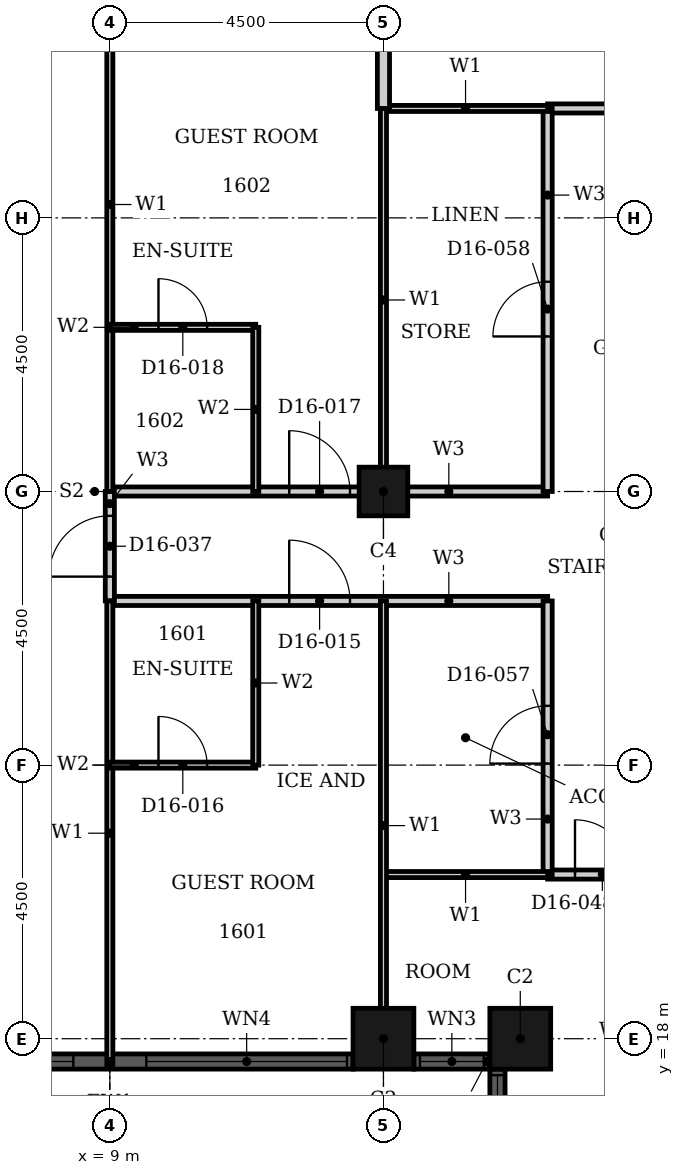
"""IFC4 building model, lengths in metres.
Left out: names, types, materials, properties, quantities, classifications, styles, units other than length and angle.
Written with IfcOpenShell. Run it as: python <this file> out.ifc"""

import sys

from ifc_helpers import new_model, si_unit, direction, frame, frame_2d, origin, origin_2d, place, context, subcontext, project, spatial, rectangle, hollow_rectangle, extrude, element, fill, save


model = new_model("IFC4")
c1 = context("Model", 3, precision=1e-05, world=origin(), true_north=direction((0.0, 1.0)))
c2 = subcontext(c1, "Body", "Model", "MODEL_VIEW")
j1 = project(units=[si_unit("LENGTHUNIT", "METRE"), si_unit("PLANEANGLEUNIT", "RADIAN")], contexts=[c1])
p1 = place(None, origin())
s1 = spatial("IfcSite", under=j1, at=p1, CompositionType="ELEMENT")
p2 = place(p1, origin())
s2 = spatial("IfcBuilding", under=s1, at=p2, CompositionType="ELEMENT")
p3 = place(p2, frame((0.0, 0.0, 70.8)))
s3 = spatial("IfcBuildingStorey", under=s2, at=p3, CompositionType="ELEMENT", Elevation=70.8)
for number, where, z_axis, x_axis in (
    (1, (13.5, 18.0, 0.0), (0.0, 0.0, 1.0), (1.0, 0.0, 0.0)),
    (2, (15.75, 18.0, 0.0), (0.0, 0.0, 1.0), (1.0, 0.0, 0.0)),
):
    element("IfcColumn", number, at=place(p3, frame(where, z_axis=z_axis, x_axis=x_axis)), inside=s3, PredefinedType="COLUMN", context=c2, shape_type="SweptSolid", body=[
        extrude(hollow_rectangle(XDim=1.0, YDim=1.0, WallThickness=0.032, at=origin_2d()), origin(), (0.0, 0.0, 1.0), 3.6),
    ])
p4 = place(p3, frame((13.5, 27.0, 0.0), z_axis=(0.0, 0.0, 1.0), x_axis=(1.0, 0.0, 0.0)))
e3 = element("IfcColumn", 3, at=p4, inside=s3, PredefinedType="COLUMN", context=c2, shape_type="SweptSolid", body=[
    extrude(hollow_rectangle(XDim=0.8, YDim=0.8, WallThickness=0.025, at=origin_2d()), origin(), (0.0, 0.0, 1.0), 3.6),
])
p5 = place(p3, frame((5.0, 17.625, 0.0), z_axis=(0.0, 0.0, 1.0), x_axis=(1.0, 0.0, 0.0)))
e4 = element("IfcWall", 4, at=p5, inside=s3, PredefinedType="SOLIDWALL", context=c2, shape_type="SweptSolid", body=[
    extrude(rectangle(XDim=8.0, YDim=0.25, at=frame_2d((4.0, 0.0))), origin(), (0.0, 0.0, 1.0), 3.6),
])
p6 = place(p5, frame((0.1, 0.0, 0.9)))
e5 = element("IfcOpeningElement", 5, at=p6, cuts=e4, PredefinedType="OPENING", context=c2, shape_type="SweptSolid", body=[
    extrude(rectangle(XDim=3.3, YDim=2.08, at=frame_2d((1.65, 1.04))), frame((0.0, 0.135, 0.0), z_axis=(0.0, -1.0, 0.0), x_axis=(1.0, 0.0, 0.0)), (0.0, 0.0, 1.0), 0.27),
])
p7 = place(p5, frame((4.6, 0.0, 0.9)))
e6 = element("IfcOpeningElement", 6, at=p7, cuts=e4, PredefinedType="OPENING", context=c2, shape_type="SweptSolid", body=[
    extrude(rectangle(XDim=3.3, YDim=2.08, at=frame_2d((1.65, 1.04))), frame((0.0, 0.135, 0.0), z_axis=(0.0, -1.0, 0.0), x_axis=(1.0, 0.0, 0.0)), (0.0, 0.0, 1.0), 0.27),
])
p8 = place(p3, frame((14.0, 17.625, 0.0), z_axis=(0.0, 0.0, 1.0), x_axis=(1.0, 0.0, 0.0)))
e7 = element("IfcWall", 7, at=p8, inside=s3, PredefinedType="SOLIDWALL", context=c2, shape_type="SweptSolid", body=[
    extrude(rectangle(XDim=1.25, YDim=0.25, at=frame_2d((0.625, 0.0))), origin(), (0.0, 0.0, 1.0), 3.6),
])
p9 = place(p8, frame((0.1, 0.0, 0.9)))
e8 = element("IfcOpeningElement", 8, at=p9, cuts=e7, PredefinedType="OPENING", context=c2, shape_type="SweptSolid", body=[
    extrude(rectangle(XDim=1.05, YDim=2.08, at=frame_2d((0.525, 1.04))), frame((0.0, 0.135, 0.0), z_axis=(0.0, -1.0, 0.0), x_axis=(1.0, 0.0, 0.0)), (0.0, 0.0, 1.0), 0.27),
])
p10 = place(p3, frame((15.375, 17.5, 0.0), z_axis=(0.0, 0.0, 1.0), x_axis=(0.0, -1.0, 0.0)))
e9 = element("IfcWall", 9, at=p10, inside=s3, PredefinedType="SOLIDWALL", context=c2, shape_type="SweptSolid", body=[
    extrude(rectangle(XDim=1.25, YDim=0.25, at=frame_2d((0.625, 0.0))), origin(), (0.0, 0.0, 1.0), 3.6),
])
p11 = place(p10, frame((0.1, 0.0, 0.9)))
e10 = element("IfcOpeningElement", 10, at=p11, cuts=e9, PredefinedType="OPENING", context=c2, shape_type="SweptSolid", body=[
    extrude(rectangle(XDim=1.05, YDim=2.08, at=frame_2d((0.525, 1.04))), frame((0.0, 0.135, 0.0), z_axis=(0.0, -1.0, 0.0), x_axis=(1.0, 0.0, 0.0)), (0.0, 0.0, 1.0), 0.27),
])
p12 = place(p3, frame((16.2, 20.7, 0.0), z_axis=(0.0, 0.0, 1.0), x_axis=(1.0, 0.0, 0.0)))
e11 = element("IfcWall", 11, at=p12, inside=s3, PredefinedType="PARTITIONING", context=c2, shape_type="SweptSolid", body=[
    extrude(rectangle(XDim=13.5, YDim=0.15, at=frame_2d((6.75, 0.0))), origin(), (0.0, 0.0, 1.0), 3.3),
])
p13 = place(p12, frame((4.75, 0.0, 0.0)))
e12 = element("IfcOpeningElement", 12, at=p13, cuts=e11, PredefinedType="OPENING", context=c2, shape_type="SweptSolid", body=[
    extrude(rectangle(XDim=1.0, YDim=2.1, at=frame_2d((0.5, 1.05))), frame((0.0, 0.085, 0.0), z_axis=(0.0, -1.0, 0.0), x_axis=(1.0, 0.0, 0.0)), (0.0, 0.0, 1.0), 0.17),
])
p14 = place(p12, frame((0.45, 0.0, 0.0)))
e13 = element("IfcOpeningElement", 13, at=p14, cuts=e11, PredefinedType="OPENING", context=c2, shape_type="SweptSolid", body=[
    extrude(rectangle(XDim=0.9, YDim=2.1, at=frame_2d((0.45, 1.05))), frame((0.0, 0.085, 0.0), z_axis=(0.0, -1.0, 0.0), x_axis=(1.0, 0.0, 0.0)), (0.0, 0.0, 1.0), 0.17),
])
p15 = place(p12, frame((7.35, 0.0, 0.0)))
e14 = element("IfcOpeningElement", 14, at=p15, cuts=e11, PredefinedType="OPENING", context=c2, shape_type="SweptSolid", body=[
    extrude(rectangle(XDim=0.9, YDim=2.1, at=frame_2d((0.45, 1.05))), frame((0.0, 0.085, 0.0), z_axis=(0.0, -1.0, 0.0), x_axis=(1.0, 0.0, 0.0)), (0.0, 0.0, 1.0), 0.17),
])
p16 = place(p12, frame((10.95, 0.0, 0.0)))
e15 = element("IfcOpeningElement", 15, at=p16, cuts=e11, PredefinedType="OPENING", context=c2, shape_type="SweptSolid", body=[
    extrude(rectangle(XDim=0.9, YDim=2.1, at=frame_2d((0.45, 1.05))), frame((0.0, 0.085, 0.0), z_axis=(0.0, -1.0, 0.0), x_axis=(1.0, 0.0, 0.0)), (0.0, 0.0, 1.0), 0.17),
])
p17 = place(p3, frame((9.0, 25.2, 0.0), z_axis=(0.0, 0.0, 1.0), x_axis=(1.0, 0.0, 0.0)))
e16 = element("IfcWall", 16, at=p17, inside=s3, PredefinedType="PARTITIONING", context=c2, shape_type="SweptSolid", body=[
    extrude(rectangle(XDim=7.2, YDim=0.15, at=frame_2d((3.6, 0.0))), origin(), (0.0, 0.0, 1.0), 3.3),
])
p18 = place(p17, frame((2.95, 0.0, 0.0)))
e17 = element("IfcOpeningElement", 17, at=p18, cuts=e16, PredefinedType="OPENING", context=c2, shape_type="SweptSolid", body=[
    extrude(rectangle(XDim=1.0, YDim=2.1, at=frame_2d((0.5, 1.05))), frame((0.0, 0.085, 0.0), z_axis=(0.0, -1.0, 0.0), x_axis=(1.0, 0.0, 0.0)), (0.0, 0.0, 1.0), 0.17),
])
p19 = place(p3, frame((9.0, 27.0, 0.0), z_axis=(0.0, 0.0, 1.0), x_axis=(1.0, 0.0, 0.0)))
e18 = element("IfcWall", 18, at=p19, inside=s3, PredefinedType="PARTITIONING", context=c2, shape_type="SweptSolid", body=[
    extrude(rectangle(XDim=7.2, YDim=0.15, at=frame_2d((3.6, 0.0))), origin(), (0.0, 0.0, 1.0), 2.58),
])
p20 = place(p19, frame((2.95, 0.0, 0.0)))
e19 = element("IfcOpeningElement", 19, at=p20, cuts=e18, PredefinedType="OPENING", context=c2, shape_type="SweptSolid", body=[
    extrude(rectangle(XDim=1.0, YDim=2.1, at=frame_2d((0.5, 1.05))), frame((0.0, 0.085, 0.0), z_axis=(0.0, -1.0, 0.0), x_axis=(1.0, 0.0, 0.0)), (0.0, 0.0, 1.0), 0.17),
])
p21 = place(p3, frame((16.2, 33.3, 0.0), z_axis=(0.0, 0.0, 1.0), x_axis=(1.0, 0.0, 0.0)))
e20 = element("IfcWall", 20, at=p21, inside=s3, PredefinedType="PARTITIONING", context=c2, shape_type="SweptSolid", body=[
    extrude(rectangle(XDim=9.9, YDim=0.15, at=frame_2d((4.95, 0.0))), origin(), (0.0, 0.0, 1.0), 3.3),
])
p22 = place(p21, frame((4.75, 0.0, 0.0)))
e21 = element("IfcOpeningElement", 21, at=p22, cuts=e20, PredefinedType="OPENING", context=c2, shape_type="SweptSolid", body=[
    extrude(rectangle(XDim=1.0, YDim=2.1, at=frame_2d((0.5, 1.05))), frame((0.0, 0.085, 0.0), z_axis=(0.0, -1.0, 0.0), x_axis=(1.0, 0.0, 0.0)), (0.0, 0.0, 1.0), 0.17),
])
p23 = place(p21, frame((7.65, 0.0, 0.0)))
e22 = element("IfcOpeningElement", 22, at=p23, cuts=e20, PredefinedType="OPENING", context=c2, shape_type="SweptSolid", body=[
    extrude(rectangle(XDim=0.9, YDim=2.1, at=frame_2d((0.45, 1.05))), frame((0.0, 0.085, 0.0), z_axis=(0.0, -1.0, 0.0), x_axis=(1.0, 0.0, 0.0)), (0.0, 0.0, 1.0), 0.17),
])
p24 = place(p3, frame((16.2, 27.0, 0.0), z_axis=(0.0, 0.0, 1.0), x_axis=(0.0, 1.0, 0.0)))
e23 = element("IfcWall", 23, at=p24, inside=s3, PredefinedType="PARTITIONING", context=c2, shape_type="SweptSolid", body=[
    extrude(rectangle(XDim=6.3, YDim=0.15, at=frame_2d((3.15, 0.0))), origin(), (0.0, 0.0, 1.0), 3.3),
])
p25 = place(p24, frame((2.55, 0.0, 0.0)))
e24 = element("IfcOpeningElement", 24, at=p25, cuts=e23, PredefinedType="OPENING", context=c2, shape_type="SweptSolid", body=[
    extrude(rectangle(XDim=0.9, YDim=2.1, at=frame_2d((0.45, 1.05))), frame((0.0, 0.085, 0.0), z_axis=(0.0, -1.0, 0.0), x_axis=(1.0, 0.0, 0.0)), (0.0, 0.0, 1.0), 0.17),
])
p26 = place(p3, frame((16.2, 20.7, 0.0), z_axis=(0.0, 0.0, 1.0), x_axis=(0.0, 1.0, 0.0)))
e25 = element("IfcWall", 25, at=p26, inside=s3, PredefinedType="PARTITIONING", context=c2, shape_type="SweptSolid", body=[
    extrude(rectangle(XDim=4.5, YDim=0.15, at=frame_2d((2.25, 0.0))), origin(), (0.0, 0.0, 1.0), 3.3),
])
p27 = place(p26, frame((1.825, 0.0, 0.0)))
e26 = element("IfcOpeningElement", 26, at=p27, cuts=e25, PredefinedType="OPENING", context=c2, shape_type="SweptSolid", body=[
    extrude(rectangle(XDim=0.95, YDim=2.1, at=frame_2d((0.475, 1.05))), frame((0.0, 0.085, 0.0), z_axis=(0.0, -1.0, 0.0), x_axis=(1.0, 0.0, 0.0)), (0.0, 0.0, 1.0), 0.17),
])
p28 = place(p3, frame((9.0, 25.2, 0.0), z_axis=(0.0, 0.0, 1.0), x_axis=(0.0, 1.0, 0.0)))
e27 = element("IfcWall", 27, at=p28, inside=s3, PredefinedType="PARTITIONING", context=c2, shape_type="SweptSolid", body=[
    extrude(rectangle(XDim=1.8, YDim=0.15, at=frame_2d((0.9, 0.0))), origin(), (0.0, 0.0, 1.0), 3.3),
])
p29 = place(p28, frame((0.4, 0.0, 0.0)))
e28 = element("IfcOpeningElement", 28, at=p29, cuts=e27, PredefinedType="OPENING", context=c2, shape_type="SweptSolid", body=[
    extrude(rectangle(XDim=1.0, YDim=2.1, at=frame_2d((0.5, 1.05))), frame((0.0, 0.085, 0.0), z_axis=(0.0, -1.0, 0.0), x_axis=(1.0, 0.0, 0.0)), (0.0, 0.0, 1.0), 0.17),
])
for number, where, z_axis, x_axis in (
    (29, (13.5, 20.7, 0.0), (0.0, 0.0, 1.0), (1.0, 0.0, 0.0)),
    (30, (13.5, 33.3, 0.0), (0.0, 0.0, 1.0), (1.0, 0.0, 0.0)),
):
    element("IfcWall", number, at=place(p3, frame(where, z_axis=z_axis, x_axis=x_axis)), inside=s3, PredefinedType="PARTITIONING", context=c2, shape_type="SweptSolid", body=[
        extrude(rectangle(XDim=2.7, YDim=0.1, at=frame_2d((1.35, 0.0))), origin(), (0.0, 0.0, 1.0), 3.3),
    ])
p30 = place(p3, frame((13.5, 27.0, 0.0), z_axis=(0.0, 0.0, 1.0), x_axis=(0.0, 1.0, 0.0)))
e31 = element("IfcWall", 31, at=p30, inside=s3, PredefinedType="PARTITIONING", context=c2, shape_type="SweptSolid", body=[
    extrude(rectangle(XDim=6.3, YDim=0.1, at=frame_2d((3.15, 0.0))), origin(), (0.0, 0.0, 1.0), 2.38),
])
p31 = place(p3, frame((13.5, 17.81, 0.0), z_axis=(0.0, 0.0, 1.0), x_axis=(0.0, 1.0, 0.0)))
e32 = element("IfcWall", 32, at=p31, inside=s3, PredefinedType="PARTITIONING", context=c2, shape_type="SweptSolid", body=[
    extrude(rectangle(XDim=7.39, YDim=0.1, at=frame_2d((3.695, 0.0))), origin(), (0.0, 0.0, 1.0), 2.38),
])
p32 = place(p3, frame((9.0, 27.0, 0.0), z_axis=(0.0, 0.0, 1.0), x_axis=(0.0, 1.0, 0.0)))
e33 = element("IfcWall", 33, at=p32, inside=s3, PredefinedType="PARTITIONING", context=c2, shape_type="SweptSolid", body=[
    extrude(rectangle(XDim=9.44, YDim=0.1, at=frame_2d((4.72, 0.0))), origin(), (0.0, 0.0, 1.0), 3.3),
])
p33 = place(p3, frame((9.0, 17.56, 0.0), z_axis=(0.0, 0.0, 1.0), x_axis=(0.0, 1.0, 0.0)))
e34 = element("IfcWall", 34, at=p33, inside=s3, PredefinedType="PARTITIONING", context=c2, shape_type="SweptSolid", body=[
    extrude(rectangle(XDim=7.64, YDim=0.1, at=frame_2d((3.82, 0.0))), origin(), (0.0, 0.0, 1.0), 3.3),
])
p34 = place(p3, frame((13.5, 33.3, 0.0), z_axis=(0.0, 0.0, 1.0), x_axis=(0.0, 1.0, 0.0)))
e35 = element("IfcWall", 35, at=p34, inside=s3, PredefinedType="PARTITIONING", context=c2, shape_type="SweptSolid", body=[
    extrude(rectangle(XDim=2.89, YDim=0.2, at=frame_2d((1.445, 0.0))), origin(), (0.0, 0.0, 1.0), 2.38),
])
p35 = place(p3, frame((9.0, 22.5, 0.0), z_axis=(0.0, 0.0, 1.0), x_axis=(1.0, 0.0, 0.0)))
e36 = element("IfcWall", 36, at=p35, inside=s3, PredefinedType="PARTITIONING", context=c2, shape_type="SweptSolid", body=[
    extrude(rectangle(XDim=2.4, YDim=0.1, at=frame_2d((1.2, 0.0))), origin(), (0.0, 0.0, 1.0), 2.58),
])
p36 = place(p35, frame((0.8, 0.0, 0.0)))
e37 = element("IfcOpeningElement", 37, at=p36, cuts=e36, PredefinedType="OPENING", context=c2, shape_type="SweptSolid", body=[
    extrude(rectangle(XDim=0.8, YDim=2.1, at=frame_2d((0.4, 1.05))), frame((0.0, 0.06, 0.0), z_axis=(0.0, -1.0, 0.0), x_axis=(1.0, 0.0, 0.0)), (0.0, 0.0, 1.0), 0.12),
])
p37 = place(p3, frame((9.0, 29.7, 0.0), z_axis=(0.0, 0.0, 1.0), x_axis=(1.0, 0.0, 0.0)))
e38 = element("IfcWall", 38, at=p37, inside=s3, PredefinedType="PARTITIONING", context=c2, shape_type="SweptSolid", body=[
    extrude(rectangle(XDim=2.4, YDim=0.1, at=frame_2d((1.2, 0.0))), origin(), (0.0, 0.0, 1.0), 3.3),
])
p38 = place(p37, frame((0.8, 0.0, 0.0)))
e39 = element("IfcOpeningElement", 39, at=p38, cuts=e38, PredefinedType="OPENING", context=c2, shape_type="SweptSolid", body=[
    extrude(rectangle(XDim=0.8, YDim=2.1, at=frame_2d((0.4, 1.05))), frame((0.0, 0.06, 0.0), z_axis=(0.0, -1.0, 0.0), x_axis=(1.0, 0.0, 0.0)), (0.0, 0.0, 1.0), 0.12),
])
for number, where, z_axis, x_axis in (
    (40, (11.4, 27.0, 0.0), (0.0, 0.0, 1.0), (0.0, 1.0, 0.0)),
    (41, (11.4, 22.5, 0.0), (0.0, 0.0, 1.0), (0.0, 1.0, 0.0)),
):
    element("IfcWall", number, at=place(p3, frame(where, z_axis=z_axis, x_axis=x_axis)), inside=s3, PredefinedType="PARTITIONING", context=c2, shape_type="SweptSolid", body=[
        extrude(rectangle(XDim=2.7, YDim=0.1, at=frame_2d((1.35, 0.0))), origin(), (0.0, 0.0, 1.0), 3.3),
    ])
p39 = place(p6, origin())
e42 = element("IfcWindow", 42, at=p39, inside=s3, PartitioningType="SINGLE_PANEL", PredefinedType="WINDOW", context=c2, shape_type="SweptSolid", body=[
    extrude(rectangle(XDim=3.3, YDim=2.08, at=frame_2d((1.65, 1.04))), frame((0.0, 0.03, 0.0), z_axis=(0.0, -1.0, 0.0), x_axis=(1.0, 0.0, 0.0)), (0.0, 0.0, 1.0), 0.06),
])
fill(e5, e42)
p40 = place(p7, origin())
e43 = element("IfcWindow", 43, at=p40, inside=s3, PartitioningType="SINGLE_PANEL", PredefinedType="WINDOW", context=c2, shape_type="SweptSolid", body=[
    extrude(rectangle(XDim=3.3, YDim=2.08, at=frame_2d((1.65, 1.04))), frame((0.0, 0.03, 0.0), z_axis=(0.0, -1.0, 0.0), x_axis=(1.0, 0.0, 0.0)), (0.0, 0.0, 1.0), 0.06),
])
fill(e6, e43)
p41 = place(p9, origin())
e44 = element("IfcWindow", 44, at=p41, inside=s3, PartitioningType="SINGLE_PANEL", PredefinedType="WINDOW", context=c2, shape_type="SweptSolid", body=[
    extrude(rectangle(XDim=1.05, YDim=2.08, at=frame_2d((0.525, 1.04))), frame((0.0, 0.03, 0.0), z_axis=(0.0, -1.0, 0.0), x_axis=(1.0, 0.0, 0.0)), (0.0, 0.0, 1.0), 0.06),
])
fill(e8, e44)
p42 = place(p11, origin())
e45 = element("IfcWindow", 45, at=p42, inside=s3, PartitioningType="SINGLE_PANEL", PredefinedType="WINDOW", context=c2, shape_type="SweptSolid", body=[
    extrude(rectangle(XDim=1.05, YDim=2.08, at=frame_2d((0.525, 1.04))), frame((0.0, 0.03, 0.0), z_axis=(0.0, -1.0, 0.0), x_axis=(1.0, 0.0, 0.0)), (0.0, 0.0, 1.0), 0.06),
])
fill(e10, e45)
p43 = place(p18, origin())
e46 = element("IfcDoor", 46, at=p43, inside=s3, OperationType="SINGLE_SWING_RIGHT", PredefinedType="DOOR", context=c2, shape_type="SweptSolid", body=[
    extrude(rectangle(XDim=1.0, YDim=2.1, at=frame_2d((0.5, 1.05))), frame((0.0, 0.025, 0.0), z_axis=(0.0, -1.0, 0.0), x_axis=(1.0, 0.0, 0.0)), (0.0, 0.0, 1.0), 0.05),
])
fill(e17, e46)
p44 = place(p36, origin())
e47 = element("IfcDoor", 47, at=p44, inside=s3, OperationType="SINGLE_SWING_RIGHT", PredefinedType="DOOR", context=c2, shape_type="SweptSolid", body=[
    extrude(rectangle(XDim=0.8, YDim=2.1, at=frame_2d((0.4, 1.05))), frame((0.0, 0.025, 0.0), z_axis=(0.0, -1.0, 0.0), x_axis=(1.0, 0.0, 0.0)), (0.0, 0.0, 1.0), 0.05),
])
fill(e37, e47)
p45 = place(p20, origin())
e48 = element("IfcDoor", 48, at=p45, inside=s3, OperationType="SINGLE_SWING_RIGHT", PredefinedType="DOOR", context=c2, shape_type="SweptSolid", body=[
    extrude(rectangle(XDim=1.0, YDim=2.1, at=frame_2d((0.5, 1.05))), frame((0.0, 0.025, 0.0), z_axis=(0.0, -1.0, 0.0), x_axis=(1.0, 0.0, 0.0)), (0.0, 0.0, 1.0), 0.05),
])
fill(e19, e48)
p46 = place(p38, origin())
e49 = element("IfcDoor", 49, at=p46, inside=s3, OperationType="SINGLE_SWING_RIGHT", PredefinedType="DOOR", context=c2, shape_type="SweptSolid", body=[
    extrude(rectangle(XDim=0.8, YDim=2.1, at=frame_2d((0.4, 1.05))), frame((0.0, 0.025, 0.0), z_axis=(0.0, -1.0, 0.0), x_axis=(1.0, 0.0, 0.0)), (0.0, 0.0, 1.0), 0.05),
])
fill(e39, e49)
p47 = place(p29, origin())
e50 = element("IfcDoor", 50, at=p47, inside=s3, OperationType="SINGLE_SWING_RIGHT", PredefinedType="DOOR", context=c2, shape_type="SweptSolid", body=[
    extrude(rectangle(XDim=1.0, YDim=2.1, at=frame_2d((0.5, 1.05))), frame((0.0, 0.025, 0.0), z_axis=(0.0, -1.0, 0.0), x_axis=(1.0, 0.0, 0.0)), (0.0, 0.0, 1.0), 0.05),
])
fill(e28, e50)
p48 = place(p14, origin())
e51 = element("IfcDoor", 51, at=p48, inside=s3, OperationType="SINGLE_SWING_RIGHT", PredefinedType="DOOR", context=c2, shape_type="SweptSolid", body=[
    extrude(rectangle(XDim=0.9, YDim=2.1, at=frame_2d((0.45, 1.05))), frame((0.0, 0.025, 0.0), z_axis=(0.0, -1.0, 0.0), x_axis=(1.0, 0.0, 0.0)), (0.0, 0.0, 1.0), 0.05),
])
fill(e13, e51)
p49 = place(p27, origin())
e52 = element("IfcDoor", 52, at=p49, inside=s3, OperationType="SINGLE_SWING_RIGHT", PredefinedType="DOOR", context=c2, shape_type="SweptSolid", body=[
    extrude(rectangle(XDim=0.95, YDim=2.1, at=frame_2d((0.475, 1.05))), frame((0.0, 0.025, 0.0), z_axis=(0.0, -1.0, 0.0), x_axis=(1.0, 0.0, 0.0)), (0.0, 0.0, 1.0), 0.05),
])
fill(e26, e52)
p50 = place(p25, origin())
e53 = element("IfcDoor", 53, at=p50, inside=s3, OperationType="SINGLE_SWING_LEFT", PredefinedType="DOOR", context=c2, shape_type="SweptSolid", body=[
    extrude(rectangle(XDim=0.9, YDim=2.1, at=frame_2d((0.45, 1.05))), frame((0.0, 0.025, 0.0), z_axis=(0.0, -1.0, 0.0), x_axis=(1.0, 0.0, 0.0)), (0.0, 0.0, 1.0), 0.05),
])
fill(e24, e53)
save(model, sys.argv[1])
